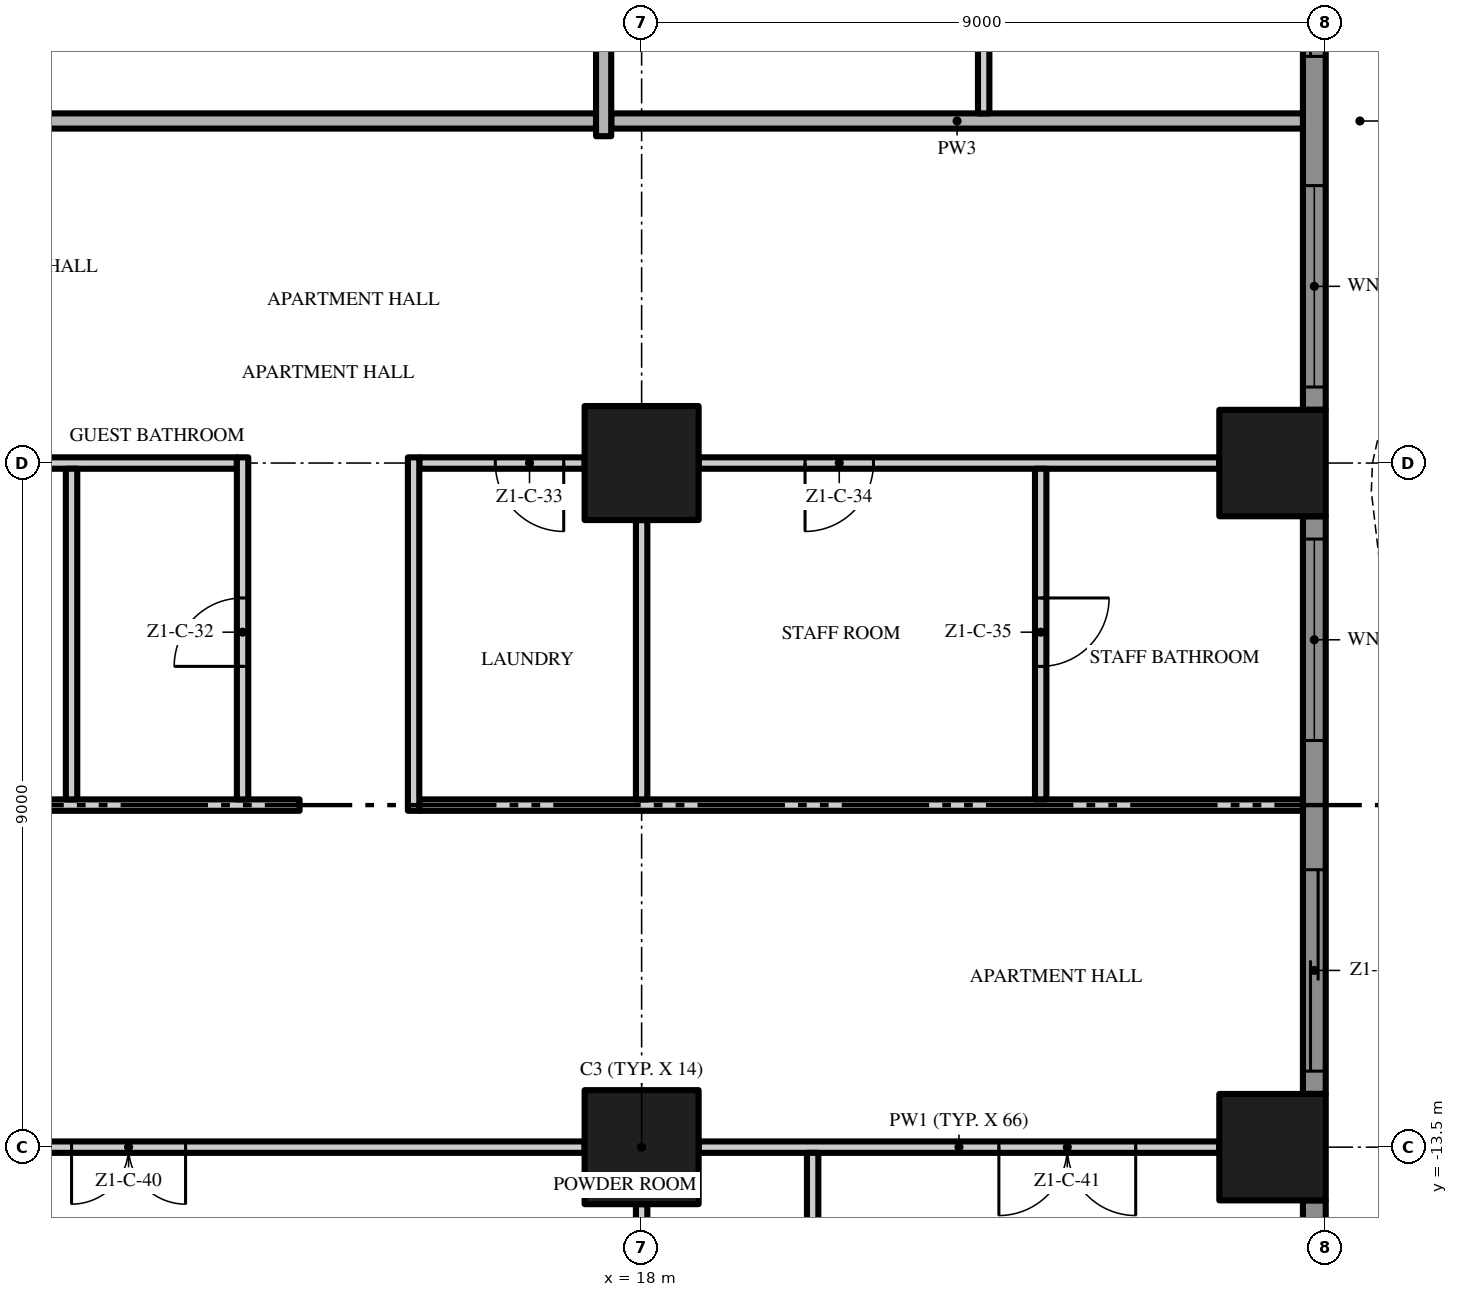
"""IFC4 building model, lengths in metres.
Left out: names, types, materials, properties, quantities, classifications, styles, units other than length and angle.
Written with IfcOpenShell. Run it as: python <this file> out.ifc"""

import sys

from ifc_helpers import new_model, si_unit, direction, frame, frame_2d, origin, origin_2d, place, context, subcontext, project, spatial, polyline, rectangle, outline, extrude, element, fill, save


model = new_model("IFC4")
c1 = context("Model", 3, precision=1e-05, world=origin(), true_north=direction((0.0, 1.0)))
c2 = subcontext(c1, "Body", "Model", "MODEL_VIEW")
j1 = project(units=[si_unit("LENGTHUNIT", "METRE"), si_unit("PLANEANGLEUNIT", "RADIAN")], contexts=[c1])
p1 = place(None, origin())
s1 = spatial("IfcSite", under=j1, at=p1, CompositionType="ELEMENT")
p2 = place(p1, origin())
s2 = spatial("IfcBuilding", under=s1, at=p2, CompositionType="ELEMENT")
p3 = place(p2, frame((0.0, 0.0, 41.6)))
s3 = spatial("IfcBuildingStorey", under=s2, at=p3, CompositionType="ELEMENT", Elevation=41.6)
for number, where, z_axis, x_axis in (
    (1, (18.0, -13.5, 0.0), (0.0, 0.0, 1.0), (1.0, 0.0, 0.0)),
    (2, (18.0, -4.5, 0.0), (0.0, 0.0, 1.0), (1.0, 0.0, 0.0)),
):
    element("IfcColumn", number, at=place(p3, frame(where, z_axis=z_axis, x_axis=x_axis)), inside=s3, PredefinedType="COLUMN", context=c2, shape_type="SweptSolid", body=[
        extrude(rectangle(XDim=1.5, YDim=1.5, at=origin_2d()), origin(), (0.0, 0.0, 1.0), 3.5),
    ])
for number, where, z_axis, x_axis in (
    (3, (26.3, -13.5, 0.0), (0.0, 0.0, 1.0), (1.0, 0.0, 0.0)),
    (4, (26.3, -4.5, 0.0), (0.0, 0.0, 1.0), (1.0, 0.0, 0.0)),
):
    element("IfcColumn", number, at=place(p3, frame(where, z_axis=z_axis, x_axis=x_axis)), inside=s3, PredefinedType="COLUMN", context=c2, shape_type="SweptSolid", body=[
        extrude(rectangle(XDim=1.4, YDim=1.4, at=origin_2d()), origin(), (0.0, 0.0, 1.0), 3.5),
    ])
p4 = place(p3, frame((26.85, -14.2, 0.0), z_axis=(0.0, 0.0, 1.0), x_axis=(0.0, -1.0, 0.0)))
e5 = element("IfcWall", 5, at=p4, inside=s3, PredefinedType="SOLIDWALL", context=c2, shape_type="SweptSolid", body=[
    extrude(rectangle(XDim=3.5, YDim=0.3, at=frame_2d((1.75, 0.0))), origin(), (0.0, 0.0, 1.0), 3.5),
])
p5 = place(p4, frame((0.3, 0.0, 0.45)))
e6 = element("IfcOpeningElement", 6, at=p5, cuts=e5, PredefinedType="OPENING", context=c2, shape_type="SweptSolid", body=[
    extrude(rectangle(XDim=2.65, YDim=2.65, at=frame_2d((1.325, 1.325))), frame((0.0, 0.16, 0.0), z_axis=(0.0, -1.0, 0.0), x_axis=(1.0, 0.0, 0.0)), (0.0, 0.0, 1.0), 0.32),
])
p6 = place(p3, frame((26.85, -5.2, 0.0), z_axis=(0.0, 0.0, 1.0), x_axis=(0.0, -1.0, 0.0)))
e7 = element("IfcWall", 7, at=p6, inside=s3, PredefinedType="SOLIDWALL", context=c2, shape_type="SweptSolid", body=[
    extrude(rectangle(XDim=7.6, YDim=0.3, at=frame_2d((3.8, 0.0))), origin(), (0.0, 0.0, 1.0), 3.5),
])
p7 = place(p6, frame((4.65, 0.0, 0.0)))
e8 = element("IfcOpeningElement", 8, at=p7, cuts=e7, PredefinedType="OPENING", context=c2, shape_type="SweptSolid", body=[
    extrude(rectangle(XDim=2.65, YDim=2.4, at=frame_2d((1.325, 1.2))), frame((0.0, 0.16, 0.0), z_axis=(0.0, -1.0, 0.0), x_axis=(1.0, 0.0, 0.0)), (0.0, 0.0, 1.0), 0.32),
])
p8 = place(p6, frame((0.3, 0.0, 0.45)))
e9 = element("IfcOpeningElement", 9, at=p8, cuts=e7, PredefinedType="OPENING", context=c2, shape_type="SweptSolid", body=[
    extrude(rectangle(XDim=2.65, YDim=2.65, at=frame_2d((1.325, 1.325))), frame((0.0, 0.16, 0.0), z_axis=(0.0, -1.0, 0.0), x_axis=(1.0, 0.0, 0.0)), (0.0, 0.0, 1.0), 0.32),
])
p9 = place(p3, frame((26.85, 3.8, 0.0), z_axis=(0.0, 0.0, 1.0), x_axis=(0.0, -1.0, 0.0)))
e10 = element("IfcWall", 10, at=p9, inside=s3, PredefinedType="SOLIDWALL", context=c2, shape_type="SweptSolid", body=[
    extrude(rectangle(XDim=7.6, YDim=0.3, at=frame_2d((3.8, 0.0))), origin(), (0.0, 0.0, 1.0), 3.5),
])
p10 = place(p9, frame((4.65, 0.0, 0.45)))
e11 = element("IfcOpeningElement", 11, at=p10, cuts=e10, PredefinedType="OPENING", context=c2, shape_type="SweptSolid", body=[
    extrude(rectangle(XDim=2.65, YDim=2.65, at=frame_2d((1.325, 1.325))), frame((0.0, 0.16, 0.0), z_axis=(0.0, -1.0, 0.0), x_axis=(1.0, 0.0, 0.0)), (0.0, 0.0, 1.0), 0.32),
])
p11 = place(p9, frame((0.3, 0.0, 0.0)))
e12 = element("IfcOpeningElement", 12, at=p11, cuts=e10, PredefinedType="OPENING", context=c2, shape_type="SweptSolid", body=[
    extrude(rectangle(XDim=2.65, YDim=2.4, at=frame_2d((1.325, 1.2))), frame((0.0, 0.16, 0.0), z_axis=(0.0, -1.0, 0.0), x_axis=(1.0, 0.0, 0.0)), (0.0, 0.0, 1.0), 0.32),
])
p12 = place(p3, origin())
e13 = element("IfcWall", 13, at=p12, inside=s3, PredefinedType="USERDEFINED", context=c2, shape_type="SweptSolid", body=[
    extrude(outline(polyline([(27.951, -18.0), (28.612, -16.5), (29.345, -15.0), (29.869, -13.5), (30.0, -12.375), (29.985, -12.0), (29.649, -10.5), (28.988, -9.0), (28.255, -7.5), (27.731, -6.0), (27.6, -4.875), (27.615, -4.5), (27.951, -3.0), (28.612, -1.5), (29.345, 0.0), (29.869, 1.5), (30.0, 2.625), (29.985, 3.0), (29.649, 4.5), (28.988, 6.0), (28.255, 7.5), (27.731, 9.0), (27.6, 10.125), (27.615, 10.5), (27.951, 12.0), (28.612, 13.5), (29.345, 15.0), (29.869, 16.5), (30.0, 17.625), (29.985, 18.0), (29.735, 17.99), (29.749, 17.635), (29.624, 16.556), (29.114, 15.096), (28.385, 13.605), (27.713, 12.079), (27.366, 10.533), (27.349, 10.115), (27.486, 8.944), (28.024, 7.404), (28.761, 5.895), (29.41, 4.421), (29.736, 2.967), (29.749, 2.635), (29.624, 1.556), (29.114, 0.096), (28.385, -1.395), (27.713, -2.921), (27.366, -4.467), (27.349, -4.885), (27.486, -6.056), (28.024, -7.596), (28.761, -9.105), (29.41, -10.579), (29.736, -12.033), (29.749, -12.365), (29.624, -13.444), (29.114, -14.904), (28.385, -16.395), (27.723, -17.899), (27.951, -18.0)])), origin(), (0.0, 0.0, 1.0), 0.9),
])
p13 = place(p3, frame((17.25, -13.5, 0.0), z_axis=(0.0, 0.0, 1.0), x_axis=(-1.0, 0.0, 0.0)))
e14 = element("IfcWall", 14, at=p13, inside=s3, PredefinedType="PARTITIONING", context=c2, shape_type="SweptSolid", body=[
    extrude(rectangle(XDim=7.5, YDim=0.15, at=frame_2d((3.75, 0.0))), origin(), (0.0, 0.0, 1.0), 3.5),
])
p14 = place(p13, frame((5.25, 0.0, 0.0)))
e15 = element("IfcOpeningElement", 15, at=p14, cuts=e14, PredefinedType="OPENING", context=c2, shape_type="SweptSolid", body=[
    extrude(rectangle(XDim=1.5, YDim=2.4, at=frame_2d((0.75, 1.2))), frame((0.0, 0.085, 0.0), z_axis=(0.0, -1.0, 0.0), x_axis=(1.0, 0.0, 0.0)), (0.0, 0.0, 1.0), 0.17),
])
p15 = place(p3, frame((25.6, -13.5, 0.0), z_axis=(0.0, 0.0, 1.0), x_axis=(-1.0, 0.0, 0.0)))
e16 = element("IfcWall", 16, at=p15, inside=s3, PredefinedType="PARTITIONING", context=c2, shape_type="SweptSolid", body=[
    extrude(rectangle(XDim=6.85, YDim=0.15, at=frame_2d((3.425, 0.0))), origin(), (0.0, 0.0, 1.0), 3.5),
])
p16 = place(p15, frame((1.1, 0.0, 0.0)))
e17 = element("IfcOpeningElement", 17, at=p16, cuts=e16, PredefinedType="OPENING", context=c2, shape_type="SweptSolid", body=[
    extrude(rectangle(XDim=1.8, YDim=2.4, at=frame_2d((0.9, 1.2))), frame((0.0, 0.085, 0.0), z_axis=(0.0, -1.0, 0.0), x_axis=(1.0, 0.0, 0.0)), (0.0, 0.0, 1.0), 0.17),
])
p17 = place(p3, frame((0.1, -9.0, 0.0), z_axis=(0.0, 0.0, 1.0), x_axis=(1.0, 0.0, 0.0)))
e18 = element("IfcWall", 18, at=p17, inside=s3, PredefinedType="PARTITIONING", context=c2, shape_type="SweptSolid", body=[
    extrude(rectangle(XDim=13.4, YDim=0.15, at=frame_2d((6.7, 0.0))), origin(), (0.0, 0.0, 1.0), 3.5),
])
p18 = place(p17, frame((0.4, 0.0, 0.0)))
e19 = element("IfcOpeningElement", 19, at=p18, cuts=e18, PredefinedType="OPENING", context=c2, shape_type="SweptSolid", body=[
    extrude(rectangle(XDim=0.8, YDim=2.0, at=frame_2d((0.4, 1.0))), frame((0.0, 0.085, 0.0), z_axis=(0.0, -1.0, 0.0), x_axis=(1.0, 0.0, 0.0)), (0.0, 0.0, 1.0), 0.17),
])
p19 = place(p17, frame((6.9, 0.0, 0.0)))
e20 = element("IfcOpeningElement", 20, at=p19, cuts=e18, PredefinedType="OPENING", context=c2, shape_type="SweptSolid", body=[
    extrude(rectangle(XDim=1.0, YDim=2.4, at=frame_2d((0.5, 1.2))), frame((0.0, 0.085, 0.0), z_axis=(0.0, -1.0, 0.0), x_axis=(1.0, 0.0, 0.0)), (0.0, 0.0, 1.0), 0.17),
])
p20 = place(p3, frame((15.075, -9.0, 0.0), z_axis=(0.0, 0.0, 1.0), x_axis=(1.0, 0.0, 0.0)))
e21 = element("IfcWall", 21, at=p20, inside=s3, PredefinedType="PARTITIONING", context=c2, shape_type="SweptSolid", body=[
    extrude(rectangle(XDim=11.625, YDim=0.15, at=frame_2d((5.812, 0.0))), origin(), (0.0, 0.0, 1.0), 3.5),
])
p21 = place(p3, frame((9.75, -4.5, 0.0), z_axis=(0.0, 0.0, 1.0), x_axis=(1.0, 0.0, 0.0)))
e22 = element("IfcWall", 22, at=p21, inside=s3, PredefinedType="PARTITIONING", context=c2, shape_type="SweptSolid", body=[
    extrude(rectangle(XDim=2.925, YDim=0.15, at=frame_2d((1.462, 0.0))), origin(), (0.0, 0.0, 1.0), 3.5),
])
p22 = place(p3, frame((17.25, -4.5, 0.0), z_axis=(0.0, 0.0, 1.0), x_axis=(-1.0, 0.0, 0.0)))
e23 = element("IfcWall", 23, at=p22, inside=s3, PredefinedType="PARTITIONING", context=c2, shape_type="SweptSolid", body=[
    extrude(rectangle(XDim=2.175, YDim=0.15, at=frame_2d((1.087, 0.0))), origin(), (0.0, 0.0, 1.0), 3.5),
])
p23 = place(p22, frame((0.275, 0.0, 0.0)))
e24 = element("IfcOpeningElement", 24, at=p23, cuts=e23, PredefinedType="OPENING", context=c2, shape_type="SweptSolid", body=[
    extrude(rectangle(XDim=0.9, YDim=2.1, at=frame_2d((0.45, 1.05))), frame((0.0, 0.085, 0.0), z_axis=(0.0, -1.0, 0.0), x_axis=(1.0, 0.0, 0.0)), (0.0, 0.0, 1.0), 0.17),
])
p24 = place(p3, frame((25.6, -4.5, 0.0), z_axis=(0.0, 0.0, 1.0), x_axis=(-1.0, 0.0, 0.0)))
e25 = element("IfcWall", 25, at=p24, inside=s3, PredefinedType="PARTITIONING", context=c2, shape_type="SweptSolid", body=[
    extrude(rectangle(XDim=6.85, YDim=0.15, at=frame_2d((3.425, 0.0))), origin(), (0.0, 0.0, 1.0), 3.5),
])
p25 = place(p24, frame((4.55, 0.0, 0.0)))
e26 = element("IfcOpeningElement", 26, at=p25, cuts=e25, PredefinedType="OPENING", context=c2, shape_type="SweptSolid", body=[
    extrude(rectangle(XDim=0.9, YDim=2.1, at=frame_2d((0.45, 1.05))), frame((0.0, 0.085, 0.0), z_axis=(0.0, -1.0, 0.0), x_axis=(1.0, 0.0, 0.0)), (0.0, 0.0, 1.0), 0.17),
])
p26 = place(p3, frame((17.4, 0.0, 0.0), z_axis=(0.0, 0.0, 1.0), x_axis=(-1.0, 0.0, 0.0)))
e27 = element("IfcWall", 27, at=p26, inside=s3, PredefinedType="PARTITIONING", context=c2, shape_type="SweptSolid", body=[
    extrude(rectangle(XDim=17.3, YDim=0.2, at=frame_2d((8.65, 0.0))), origin(), (0.0, 0.0, 1.0), 3.5),
])
p27 = place(p26, frame((7.65, 0.0, 0.0)))
e28 = element("IfcOpeningElement", 28, at=p27, cuts=e27, PredefinedType="OPENING", context=c2, shape_type="SweptSolid", body=[
    extrude(rectangle(XDim=1.5, YDim=2.4, at=frame_2d((0.75, 1.2))), frame((0.0, 0.11, 0.0), z_axis=(0.0, -1.0, 0.0), x_axis=(1.0, 0.0, 0.0)), (0.0, 0.0, 1.0), 0.22),
])
p28 = place(p3, frame((17.6, 0.0, 0.0), z_axis=(0.0, 0.0, 1.0), x_axis=(1.0, 0.0, 0.0)))
e29 = element("IfcWall", 29, at=p28, inside=s3, PredefinedType="PARTITIONING", context=c2, shape_type="SweptSolid", body=[
    extrude(rectangle(XDim=9.1, YDim=0.2, at=frame_2d((4.55, 0.0))), origin(), (0.0, 0.0, 1.0), 3.5),
])
p29 = place(p3, frame((10.5, -8.925, 0.0), z_axis=(0.0, 0.0, 1.0), x_axis=(0.0, 1.0, 0.0)))
e30 = element("IfcWall", 30, at=p29, inside=s3, PredefinedType="PARTITIONING", context=c2, shape_type="SweptSolid", body=[
    extrude(rectangle(XDim=4.35, YDim=0.15, at=frame_2d((2.175, 0.0))), origin(), (0.0, 0.0, 1.0), 3.5),
])
p30 = place(p3, frame((12.75, -8.925, 0.0), z_axis=(0.0, 0.0, 1.0), x_axis=(0.0, 1.0, 0.0)))
e31 = element("IfcWall", 31, at=p30, inside=s3, PredefinedType="PARTITIONING", context=c2, shape_type="SweptSolid", body=[
    extrude(rectangle(XDim=4.5, YDim=0.15, at=frame_2d((2.25, 0.0))), origin(), (0.0, 0.0, 1.0), 3.5),
])
p31 = place(p30, frame((1.75, 0.0, 0.0)))
e32 = element("IfcOpeningElement", 32, at=p31, cuts=e31, PredefinedType="OPENING", context=c2, shape_type="SweptSolid", body=[
    extrude(rectangle(XDim=0.9, YDim=2.1, at=frame_2d((0.45, 1.05))), frame((0.0, 0.085, 0.0), z_axis=(0.0, -1.0, 0.0), x_axis=(1.0, 0.0, 0.0)), (0.0, 0.0, 1.0), 0.17),
])
p32 = place(p3, frame((15.0, -9.075, 0.0), z_axis=(0.0, 0.0, 1.0), x_axis=(0.0, 1.0, 0.0)))
e33 = element("IfcWall", 33, at=p32, inside=s3, PredefinedType="PARTITIONING", context=c2, shape_type="SweptSolid", body=[
    extrude(rectangle(XDim=4.65, YDim=0.15, at=frame_2d((2.325, 0.0))), origin(), (0.0, 0.0, 1.0), 3.5),
])
p33 = place(p3, frame((17.5, -0.2, 0.0), z_axis=(0.0, 0.0, 1.0), x_axis=(0.0, 1.0, 0.0)))
e34 = element("IfcWall", 34, at=p33, inside=s3, PredefinedType="PARTITIONING", context=c2, shape_type="SweptSolid", body=[
    extrude(rectangle(XDim=3.95, YDim=0.2, at=frame_2d((1.975, 0.0))), origin(), (0.0, 0.0, 1.0), 3.5),
])
p34 = place(p3, frame((18.0, -21.1, 0.0), z_axis=(0.0, 0.0, 1.0), x_axis=(0.0, 1.0, 0.0)))
e35 = element("IfcWall", 35, at=p34, inside=s3, PredefinedType="PARTITIONING", context=c2, shape_type="SweptSolid", body=[
    extrude(rectangle(XDim=6.85, YDim=0.15, at=frame_2d((3.425, 0.0))), origin(), (0.0, 0.0, 1.0), 3.5),
])
p35 = place(p3, frame((18.0, -8.925, 0.0), z_axis=(0.0, 0.0, 1.0), x_axis=(0.0, 1.0, 0.0)))
e36 = element("IfcWall", 36, at=p35, inside=s3, PredefinedType="PARTITIONING", context=c2, shape_type="SweptSolid", body=[
    extrude(rectangle(XDim=3.675, YDim=0.15, at=frame_2d((1.837, 0.0))), origin(), (0.0, 0.0, 1.0), 3.5),
])
p36 = place(p3, frame((20.25, -16.575, 0.0), z_axis=(0.0, 0.0, 1.0), x_axis=(0.0, 1.0, 0.0)))
e37 = element("IfcWall", 37, at=p36, inside=s3, PredefinedType="PARTITIONING", context=c2, shape_type="SweptSolid", body=[
    extrude(rectangle(XDim=3.0, YDim=0.15, at=frame_2d((1.5, 0.0))), origin(), (0.0, 0.0, 1.0), 3.5),
])
p37 = place(p3, frame((22.5, 17.3, 0.0), z_axis=(0.0, 0.0, 1.0), x_axis=(0.0, -1.0, 0.0)))
e38 = element("IfcWall", 38, at=p37, inside=s3, PredefinedType="PARTITIONING", context=c2, shape_type="SweptSolid", body=[
    extrude(rectangle(XDim=17.2, YDim=0.15, at=frame_2d((8.6, 0.0))), origin(), (0.0, 0.0, 1.0), 3.5),
])
p38 = place(p37, frame((14.55, 0.0, 0.0)))
e39 = element("IfcOpeningElement", 39, at=p38, cuts=e38, PredefinedType="OPENING", context=c2, shape_type="SweptSolid", body=[
    extrude(rectangle(XDim=1.0, YDim=2.4, at=frame_2d((0.5, 1.2))), frame((0.0, 0.085, 0.0), z_axis=(0.0, -1.0, 0.0), x_axis=(1.0, 0.0, 0.0)), (0.0, 0.0, 1.0), 0.17),
])
p39 = place(p37, frame((7.4, 0.0, 0.0)))
e40 = element("IfcOpeningElement", 40, at=p39, cuts=e38, PredefinedType="OPENING", context=c2, shape_type="SweptSolid", body=[
    extrude(rectangle(XDim=1.8, YDim=2.4, at=frame_2d((0.9, 1.2))), frame((0.0, 0.085, 0.0), z_axis=(0.0, -1.0, 0.0), x_axis=(1.0, 0.0, 0.0)), (0.0, 0.0, 1.0), 0.17),
])
p40 = place(p37, frame((0.15, 0.0, 0.0)))
e41 = element("IfcOpeningElement", 41, at=p40, cuts=e38, PredefinedType="OPENING", context=c2, shape_type="SweptSolid", body=[
    extrude(rectangle(XDim=1.0, YDim=2.4, at=frame_2d((0.5, 1.2))), frame((0.0, 0.085, 0.0), z_axis=(0.0, -1.0, 0.0), x_axis=(1.0, 0.0, 0.0)), (0.0, 0.0, 1.0), 0.17),
])
p41 = place(p3, frame((23.25, -4.575, 0.0), z_axis=(0.0, 0.0, 1.0), x_axis=(0.0, -1.0, 0.0)))
e42 = element("IfcWall", 42, at=p41, inside=s3, PredefinedType="PARTITIONING", context=c2, shape_type="SweptSolid", body=[
    extrude(rectangle(XDim=4.35, YDim=0.15, at=frame_2d((2.175, 0.0))), origin(), (0.0, 0.0, 1.0), 3.5),
])
p42 = place(p41, frame((1.7, 0.0, 0.0)))
e43 = element("IfcOpeningElement", 43, at=p42, cuts=e42, PredefinedType="OPENING", context=c2, shape_type="SweptSolid", body=[
    extrude(rectangle(XDim=0.9, YDim=2.1, at=frame_2d((0.45, 1.05))), frame((0.0, 0.085, 0.0), z_axis=(0.0, -1.0, 0.0), x_axis=(1.0, 0.0, 0.0)), (0.0, 0.0, 1.0), 0.17),
])
p43 = place(p7, origin())
e44 = element("IfcDoor", 44, at=p43, inside=s3, OperationType="SINGLE_SWING_LEFT", PredefinedType="DOOR", context=c2, shape_type="SweptSolid", body=[
    extrude(rectangle(XDim=2.65, YDim=2.4, at=frame_2d((1.325, 1.2))), frame((0.0, 0.025, 0.0), z_axis=(0.0, -1.0, 0.0), x_axis=(1.0, 0.0, 0.0)), (0.0, 0.0, 1.0), 0.05),
])
fill(e8, e44)
p44 = place(p8, origin())
e45 = element("IfcWindow", 45, at=p44, inside=s3, PartitioningType="SINGLE_PANEL", PredefinedType="WINDOW", context=c2, shape_type="SweptSolid", body=[
    extrude(rectangle(XDim=2.65, YDim=2.65, at=frame_2d((1.325, 1.325))), frame((0.0, 0.03, 0.0), z_axis=(0.0, -1.0, 0.0), x_axis=(1.0, 0.0, 0.0)), (0.0, 0.0, 1.0), 0.06),
])
fill(e9, e45)
p45 = place(p10, origin())
e46 = element("IfcWindow", 46, at=p45, inside=s3, PartitioningType="SINGLE_PANEL", PredefinedType="WINDOW", context=c2, shape_type="SweptSolid", body=[
    extrude(rectangle(XDim=2.65, YDim=2.65, at=frame_2d((1.325, 1.325))), frame((0.0, 0.03, 0.0), z_axis=(0.0, -1.0, 0.0), x_axis=(1.0, 0.0, 0.0)), (0.0, 0.0, 1.0), 0.06),
])
fill(e11, e46)
p46 = place(p11, origin())
e47 = element("IfcDoor", 47, at=p46, inside=s3, OperationType="SINGLE_SWING_LEFT", PredefinedType="DOOR", context=c2, shape_type="SweptSolid", body=[
    extrude(rectangle(XDim=2.65, YDim=2.4, at=frame_2d((1.325, 1.2))), frame((0.0, 0.025, 0.0), z_axis=(0.0, -1.0, 0.0), x_axis=(1.0, 0.0, 0.0)), (0.0, 0.0, 1.0), 0.05),
])
fill(e12, e47)
p47 = place(p31, origin())
e48 = element("IfcDoor", 48, at=p47, inside=s3, OperationType="SINGLE_SWING_LEFT", PredefinedType="DOOR", context=c2, shape_type="SweptSolid", body=[
    extrude(rectangle(XDim=0.9, YDim=2.1, at=frame_2d((0.45, 1.05))), frame((0.0, 0.025, 0.0), z_axis=(0.0, -1.0, 0.0), x_axis=(1.0, 0.0, 0.0)), (0.0, 0.0, 1.0), 0.05),
])
fill(e32, e48)
p48 = place(p23, origin())
e49 = element("IfcDoor", 49, at=p48, inside=s3, OperationType="SINGLE_SWING_LEFT", PredefinedType="DOOR", context=c2, shape_type="SweptSolid", body=[
    extrude(rectangle(XDim=0.9, YDim=2.1, at=frame_2d((0.45, 1.05))), frame((0.0, 0.025, 0.0), z_axis=(0.0, -1.0, 0.0), x_axis=(1.0, 0.0, 0.0)), (0.0, 0.0, 1.0), 0.05),
])
fill(e24, e49)
p49 = place(p25, origin())
e50 = element("IfcDoor", 50, at=p49, inside=s3, OperationType="SINGLE_SWING_RIGHT", PredefinedType="DOOR", context=c2, shape_type="SweptSolid", body=[
    extrude(rectangle(XDim=0.9, YDim=2.1, at=frame_2d((0.45, 1.05))), frame((0.0, 0.025, 0.0), z_axis=(0.0, -1.0, 0.0), x_axis=(1.0, 0.0, 0.0)), (0.0, 0.0, 1.0), 0.05),
])
fill(e26, e50)
p50 = place(p42, origin())
e51 = element("IfcDoor", 51, at=p50, inside=s3, OperationType="SINGLE_SWING_LEFT", PredefinedType="DOOR", context=c2, shape_type="SweptSolid", body=[
    extrude(rectangle(XDim=0.9, YDim=2.1, at=frame_2d((0.45, 1.05))), frame((0.0, 0.025, 0.0), z_axis=(0.0, -1.0, 0.0), x_axis=(1.0, 0.0, 0.0)), (0.0, 0.0, 1.0), 0.05),
])
fill(e43, e51)
p51 = place(p14, origin())
e52 = element("IfcDoor", 52, at=p51, inside=s3, OperationType="DOUBLE_DOOR_SINGLE_SWING", PredefinedType="DOOR", context=c2, shape_type="SweptSolid", body=[
    extrude(rectangle(XDim=1.5, YDim=2.4, at=frame_2d((0.75, 1.2))), frame((0.0, 0.025, 0.0), z_axis=(0.0, -1.0, 0.0), x_axis=(1.0, 0.0, 0.0)), (0.0, 0.0, 1.0), 0.05),
])
fill(e15, e52)
p52 = place(p16, origin())
e53 = element("IfcDoor", 53, at=p52, inside=s3, OperationType="DOUBLE_DOOR_SINGLE_SWING", PredefinedType="DOOR", context=c2, shape_type="SweptSolid", body=[
    extrude(rectangle(XDim=1.8, YDim=2.4, at=frame_2d((0.9, 1.2))), frame((0.0, 0.025, 0.0), z_axis=(0.0, -1.0, 0.0), x_axis=(1.0, 0.0, 0.0)), (0.0, 0.0, 1.0), 0.05),
])
fill(e17, e53)
save(model, sys.argv[1])
